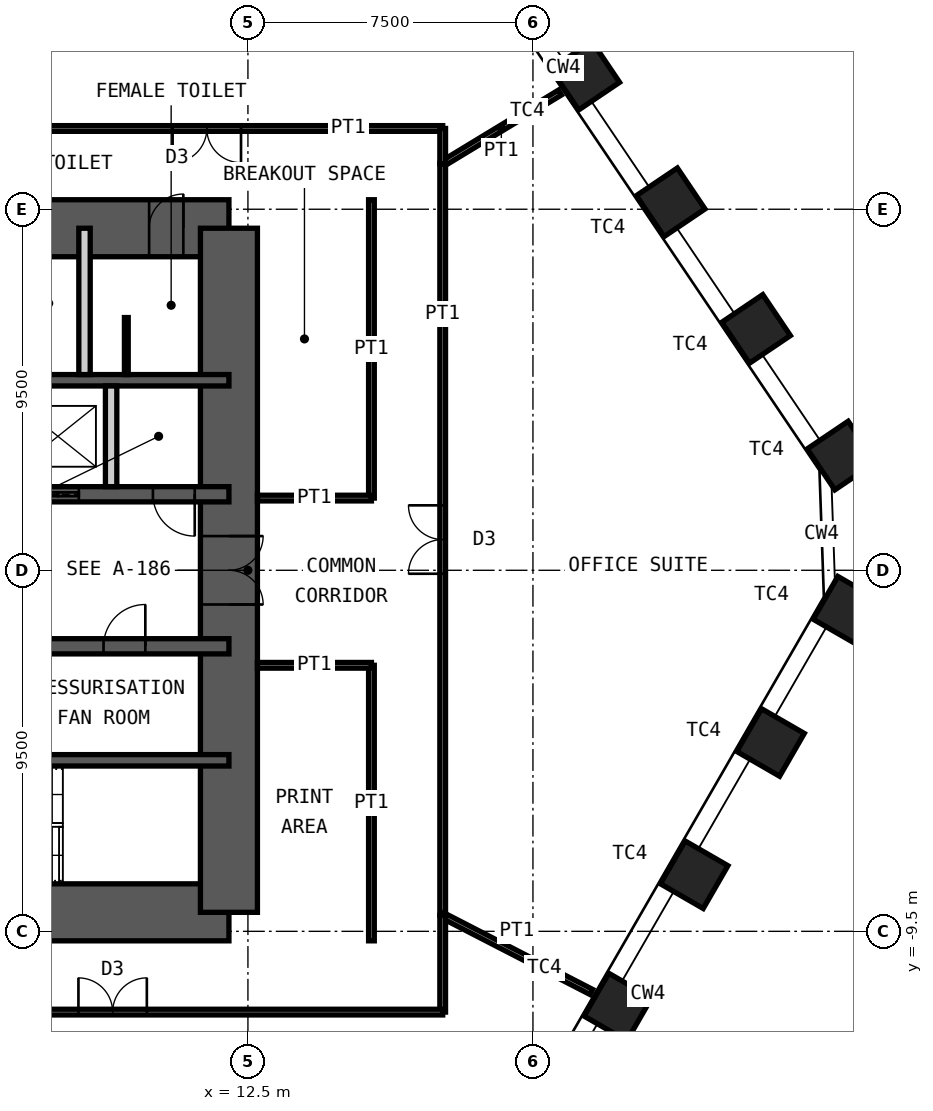
"""IFC4 building model, lengths in metres.
Left out: names, types, materials, properties, quantities, classifications, styles, units other than length and angle.
Written with IfcOpenShell. Run it as: python <this file> out.ifc"""

import sys

from ifc_helpers import new_model, si_unit, direction, frame, frame_2d, origin, origin_2d, place, context, subcontext, project, spatial, rectangle, hollow_rectangle, extrude, element, fill, save


model = new_model("IFC4")
c1 = context("Model", 3, precision=1e-05, world=origin(), true_north=direction((0.0, 1.0)))
c2 = subcontext(c1, "Body", "Model", "MODEL_VIEW")
j1 = project(units=[si_unit("LENGTHUNIT", "METRE"), si_unit("PLANEANGLEUNIT", "RADIAN")], contexts=[c1])
p1 = place(None, origin())
s1 = spatial("IfcSite", under=j1, at=p1, CompositionType="ELEMENT")
p2 = place(p1, origin())
s2 = spatial("IfcBuilding", under=s1, at=p2, CompositionType="ELEMENT")
p3 = place(p2, frame((0.0, 0.0, 145.0)))
s3 = spatial("IfcBuildingStorey", under=s2, at=p3, CompositionType="ELEMENT", Elevation=145.0)
for number, where, z_axis, x_axis in (
    (1, (21.377, 13.014, 0.0), (0.0, 0.0, 1.0), (-0.559, 0.829, 0.0)),
    (2, (23.625, 9.682, 0.0), (0.0, 0.0, 1.0), (-0.559, 0.829, 0.0)),
    (3, (25.872, 6.351, 0.0), (0.0, 0.0, 1.0), (-0.559, 0.829, 0.0)),
    (4, (28.119, 3.019, 0.0), (0.0, 0.0, 1.0), (-0.559, 0.829, 0.0)),
    (5, (28.261, -1.05, 0.0), (0.0, 0.0, 1.0), (0.5, 0.866, 0.0)),
    (6, (26.252, -4.53, 0.0), (0.0, 0.0, 1.0), (0.5, 0.866, 0.0)),
    (7, (24.242, -8.011, 0.0), (0.0, 0.0, 1.0), (0.5, 0.866, 0.0)),
    (8, (22.233, -11.491, 0.0), (0.0, 0.0, 1.0), (0.5, 0.866, 0.0)),
):
    element("IfcColumn", number, at=place(p3, frame(where, z_axis=z_axis, x_axis=x_axis)), inside=s3, PredefinedType="COLUMN", context=c2, shape_type="SweptSolid", body=[
        extrude(hollow_rectangle(XDim=1.3, YDim=1.3, WallThickness=0.1, at=origin_2d()), origin(), (0.0, 0.0, 1.0), 4.2),
    ])
p4 = place(p3, frame((-12.0, 9.0, 0.0), z_axis=(0.0, 0.0, 1.0), x_axis=(1.0, 0.0, 0.0)))
e9 = element("IfcWall", 9, at=p4, inside=s3, PredefinedType="SHEAR", context=c2, shape_type="SweptSolid", body=[
    extrude(rectangle(XDim=24.0, YDim=1.5, at=frame_2d((12.0, 0.0))), origin(), (0.0, 0.0, 1.0), 4.2),
])
p5 = place(p4, frame((10.4, 0.0, 0.0)))
e10 = element("IfcOpeningElement", 10, at=p5, cuts=e9, PredefinedType="OPENING", context=c2, shape_type="SweptSolid", body=[
    extrude(rectangle(XDim=1.0, YDim=2.1, at=frame_2d((0.5, 1.05))), frame((0.0, 0.76, 0.0), z_axis=(0.0, -1.0, 0.0), x_axis=(1.0, 0.0, 0.0)), (0.0, 0.0, 1.0), 1.52),
])
p6 = place(p4, frame((17.6, 0.0, 0.0)))
e11 = element("IfcOpeningElement", 11, at=p6, cuts=e9, PredefinedType="OPENING", context=c2, shape_type="SweptSolid", body=[
    extrude(rectangle(XDim=0.9, YDim=2.1, at=frame_2d((0.45, 1.05))), frame((0.0, 0.76, 0.0), z_axis=(0.0, -1.0, 0.0), x_axis=(1.0, 0.0, 0.0)), (0.0, 0.0, 1.0), 1.52),
])
p7 = place(p4, frame((21.9, 0.0, 0.0)))
e12 = element("IfcOpeningElement", 12, at=p7, cuts=e9, PredefinedType="OPENING", context=c2, shape_type="SweptSolid", body=[
    extrude(rectangle(XDim=0.9, YDim=2.1, at=frame_2d((0.45, 1.05))), frame((0.0, 0.76, 0.0), z_axis=(0.0, -1.0, 0.0), x_axis=(1.0, 0.0, 0.0)), (0.0, 0.0, 1.0), 1.52),
])
p8 = place(p3, frame((-12.0, -9.0, 0.0), z_axis=(0.0, 0.0, 1.0), x_axis=(1.0, 0.0, 0.0)))
e13 = element("IfcWall", 13, at=p8, inside=s3, PredefinedType="SHEAR", context=c2, shape_type="SweptSolid", body=[
    extrude(rectangle(XDim=24.0, YDim=1.5, at=frame_2d((12.0, 0.0))), origin(), (0.0, 0.0, 1.0), 4.2),
])
p9 = place(p8, frame((1.35, 0.0, 0.0)))
e14 = element("IfcOpeningElement", 14, at=p9, cuts=e13, PredefinedType="OPENING", context=c2, shape_type="SweptSolid", body=[
    extrude(rectangle(XDim=1.0, YDim=2.1, at=frame_2d((0.5, 1.05))), frame((0.0, 0.76, 0.0), z_axis=(0.0, -1.0, 0.0), x_axis=(1.0, 0.0, 0.0)), (0.0, 0.0, 1.0), 1.52),
])
p10 = place(p8, frame((5.325, 0.0, 0.0)))
e15 = element("IfcOpeningElement", 15, at=p10, cuts=e13, PredefinedType="OPENING", context=c2, shape_type="SweptSolid", body=[
    extrude(rectangle(XDim=1.15, YDim=2.1, at=frame_2d((0.575, 1.05))), frame((0.0, 0.76, 0.0), z_axis=(0.0, -1.0, 0.0), x_axis=(1.0, 0.0, 0.0)), (0.0, 0.0, 1.0), 1.52),
])
p11 = place(p8, frame((12.6, 0.0, 0.0)))
e16 = element("IfcOpeningElement", 16, at=p11, cuts=e13, PredefinedType="OPENING", context=c2, shape_type="SweptSolid", body=[
    extrude(rectangle(XDim=1.0, YDim=2.1, at=frame_2d((0.5, 1.05))), frame((0.0, 0.76, 0.0), z_axis=(0.0, -1.0, 0.0), x_axis=(1.0, 0.0, 0.0)), (0.0, 0.0, 1.0), 1.52),
])
p12 = place(p3, frame((12.0, -9.0, 0.0), z_axis=(0.0, 0.0, 1.0), x_axis=(0.0, 1.0, 0.0)))
e17 = element("IfcWall", 17, at=p12, inside=s3, PredefinedType="SHEAR", context=c2, shape_type="SweptSolid", body=[
    extrude(rectangle(XDim=18.0, YDim=1.5, at=frame_2d((9.0, 0.0))), origin(), (0.0, 0.0, 1.0), 4.2),
])
p13 = place(p12, frame((8.1, 0.0, 0.0)))
e18 = element("IfcOpeningElement", 18, at=p13, cuts=e17, PredefinedType="OPENING", context=c2, shape_type="SweptSolid", body=[
    extrude(rectangle(XDim=1.8, YDim=2.1, at=frame_2d((0.9, 1.05))), frame((0.0, 0.76, 0.0), z_axis=(0.0, -1.0, 0.0), x_axis=(1.0, 0.0, 0.0)), (0.0, 0.0, 1.0), 1.52),
])
p14 = place(p3, frame((-12.0, 5.0, 0.0), z_axis=(0.0, 0.0, 1.0), x_axis=(1.0, 0.0, 0.0)))
e19 = element("IfcWall", 19, at=p14, inside=s3, PredefinedType="SHEAR", context=c2, shape_type="SweptSolid", body=[
    extrude(rectangle(XDim=24.0, YDim=0.3, at=frame_2d((12.0, 0.0))), origin(), (0.0, 0.0, 1.0), 4.2),
])
p15 = place(p3, frame((-12.0, 2.0, 0.0), z_axis=(0.0, 0.0, 1.0), x_axis=(1.0, 0.0, 0.0)))
e20 = element("IfcWall", 20, at=p15, inside=s3, PredefinedType="SHEAR", context=c2, shape_type="SweptSolid", body=[
    extrude(rectangle(XDim=24.0, YDim=0.4, at=frame_2d((12.0, 0.0))), origin(), (0.0, 0.0, 1.0), 4.2),
])
p16 = place(p15, frame((2.4, 0.0, 0.0)))
e21 = element("IfcOpeningElement", 21, at=p16, cuts=e20, PredefinedType="OPENING", context=c2, shape_type="SweptSolid", body=[
    extrude(rectangle(XDim=1.1, YDim=2.1, at=frame_2d((0.55, 1.05))), frame((0.0, 0.21, 0.0), z_axis=(0.0, -1.0, 0.0), x_axis=(1.0, 0.0, 0.0)), (0.0, 0.0, 1.0), 0.42),
])
p17 = place(p15, frame((22.0, 0.0, 0.0)))
e22 = element("IfcOpeningElement", 22, at=p17, cuts=e20, PredefinedType="OPENING", context=c2, shape_type="SweptSolid", body=[
    extrude(rectangle(XDim=1.1, YDim=2.1, at=frame_2d((0.55, 1.05))), frame((0.0, 0.21, 0.0), z_axis=(0.0, -1.0, 0.0), x_axis=(1.0, 0.0, 0.0)), (0.0, 0.0, 1.0), 0.42),
])
p18 = place(p15, frame((10.15, 0.0, 0.0)))
e23 = element("IfcOpeningElement", 23, at=p18, cuts=e20, PredefinedType="OPENING", context=c2, shape_type="SweptSolid", body=[
    extrude(rectangle(XDim=1.0, YDim=2.1, at=frame_2d((0.5, 1.05))), frame((0.0, 0.21, 0.0), z_axis=(0.0, -1.0, 0.0), x_axis=(1.0, 0.0, 0.0)), (0.0, 0.0, 1.0), 0.42),
])
p19 = place(p15, frame((6.9, 0.0, 0.0)))
e24 = element("IfcOpeningElement", 24, at=p19, cuts=e20, PredefinedType="OPENING", context=c2, shape_type="SweptSolid", body=[
    extrude(rectangle(XDim=1.0, YDim=2.1, at=frame_2d((0.5, 1.05))), frame((0.0, 0.21, 0.0), z_axis=(0.0, -1.0, 0.0), x_axis=(1.0, 0.0, 0.0)), (0.0, 0.0, 1.0), 0.42),
])
p20 = place(p15, frame((13.35, 0.0, 0.0)))
e25 = element("IfcOpeningElement", 25, at=p20, cuts=e20, PredefinedType="OPENING", context=c2, shape_type="SweptSolid", body=[
    extrude(rectangle(XDim=1.1, YDim=2.4, at=frame_2d((0.55, 1.2))), frame((0.0, 0.21, 0.0), z_axis=(0.0, -1.0, 0.0), x_axis=(1.0, 0.0, 0.0)), (0.0, 0.0, 1.0), 0.42),
])
p21 = place(p15, frame((16.15, 0.0, 0.0)))
e26 = element("IfcOpeningElement", 26, at=p21, cuts=e20, PredefinedType="OPENING", context=c2, shape_type="SweptSolid", body=[
    extrude(rectangle(XDim=1.1, YDim=2.4, at=frame_2d((0.55, 1.2))), frame((0.0, 0.21, 0.0), z_axis=(0.0, -1.0, 0.0), x_axis=(1.0, 0.0, 0.0)), (0.0, 0.0, 1.0), 0.42),
])
p22 = place(p15, frame((18.95, 0.0, 0.0)))
e27 = element("IfcOpeningElement", 27, at=p22, cuts=e20, PredefinedType="OPENING", context=c2, shape_type="SweptSolid", body=[
    extrude(rectangle(XDim=1.1, YDim=2.4, at=frame_2d((0.55, 1.2))), frame((0.0, 0.21, 0.0), z_axis=(0.0, -1.0, 0.0), x_axis=(1.0, 0.0, 0.0)), (0.0, 0.0, 1.0), 0.42),
])
p23 = place(p3, frame((-12.0, -2.0, 0.0), z_axis=(0.0, 0.0, 1.0), x_axis=(1.0, 0.0, 0.0)))
e28 = element("IfcWall", 28, at=p23, inside=s3, PredefinedType="SHEAR", context=c2, shape_type="SweptSolid", body=[
    extrude(rectangle(XDim=24.0, YDim=0.4, at=frame_2d((12.0, 0.0))), origin(), (0.0, 0.0, 1.0), 4.2),
])
p24 = place(p23, frame((1.1, 0.0, 0.0)))
e29 = element("IfcOpeningElement", 29, at=p24, cuts=e28, PredefinedType="OPENING", context=c2, shape_type="SweptSolid", body=[
    extrude(rectangle(XDim=1.1, YDim=2.1, at=frame_2d((0.55, 1.05))), frame((0.0, 0.21, 0.0), z_axis=(0.0, -1.0, 0.0), x_axis=(1.0, 0.0, 0.0)), (0.0, 0.0, 1.0), 0.42),
])
p25 = place(p23, frame((13.55, 0.0, 0.0)))
e30 = element("IfcOpeningElement", 30, at=p25, cuts=e28, PredefinedType="OPENING", context=c2, shape_type="SweptSolid", body=[
    extrude(rectangle(XDim=1.1, YDim=2.1, at=frame_2d((0.55, 1.05))), frame((0.0, 0.21, 0.0), z_axis=(0.0, -1.0, 0.0), x_axis=(1.0, 0.0, 0.0)), (0.0, 0.0, 1.0), 0.42),
])
p26 = place(p23, frame((20.7, 0.0, 0.0)))
e31 = element("IfcOpeningElement", 31, at=p26, cuts=e28, PredefinedType="OPENING", context=c2, shape_type="SweptSolid", body=[
    extrude(rectangle(XDim=1.1, YDim=2.1, at=frame_2d((0.55, 1.05))), frame((0.0, 0.21, 0.0), z_axis=(0.0, -1.0, 0.0), x_axis=(1.0, 0.0, 0.0)), (0.0, 0.0, 1.0), 0.42),
])
p27 = place(p23, frame((4.0, 0.0, 0.0)))
e32 = element("IfcOpeningElement", 32, at=p27, cuts=e28, PredefinedType="OPENING", context=c2, shape_type="SweptSolid", body=[
    extrude(rectangle(XDim=1.0, YDim=2.1, at=frame_2d((0.5, 1.05))), frame((0.0, 0.21, 0.0), z_axis=(0.0, -1.0, 0.0), x_axis=(1.0, 0.0, 0.0)), (0.0, 0.0, 1.0), 0.42),
])
p28 = place(p3, frame((-12.0, -5.0, 0.0), z_axis=(0.0, 0.0, 1.0), x_axis=(1.0, 0.0, 0.0)))
e33 = element("IfcWall", 33, at=p28, inside=s3, PredefinedType="SHEAR", context=c2, shape_type="SweptSolid", body=[
    extrude(rectangle(XDim=24.0, YDim=0.3, at=frame_2d((12.0, 0.0))), origin(), (0.0, 0.0, 1.0), 4.2),
])
p29 = place(p3, frame((8.2, 5.15, 0.0), z_axis=(0.0, 0.0, 1.0), x_axis=(0.0, 1.0, 0.0)))
e34 = element("IfcWall", 34, at=p29, inside=s3, PredefinedType="PARTITIONING", context=c2, shape_type="SweptSolid", body=[
    extrude(rectangle(XDim=3.85, YDim=0.3, at=frame_2d((1.925, 0.0))), origin(), (0.0, 0.0, 1.0), 3.98),
])
p30 = place(p3, frame((8.9, 2.2, 0.0), z_axis=(0.0, 0.0, 1.0), x_axis=(0.0, 1.0, 0.0)))
e35 = element("IfcWall", 35, at=p30, inside=s3, PredefinedType="PARTITIONING", context=c2, shape_type="SweptSolid", body=[
    extrude(rectangle(XDim=2.65, YDim=0.3, at=frame_2d((1.325, 0.0))), origin(), (0.0, 0.0, 1.0), 3.98),
])
p31 = place(p3, frame((9.3, 5.15, 0.0), z_axis=(0.0, 0.0, 1.0), x_axis=(0.0, 1.0, 0.0)))
e36 = element("IfcWall", 36, at=p31, inside=s3, PredefinedType="PARTITIONING", context=c2, shape_type="SweptSolid", body=[
    extrude(rectangle(XDim=1.5, YDim=0.1, at=frame_2d((0.75, 0.0))), origin(), (0.0, 0.0, 1.0), 2.1),
])
p32 = place(p3, frame((20.711, 12.571, 0.0), z_axis=(0.0, 0.0, 1.0), x_axis=(-0.854862500505, -0.518854608952, 0.0)))
e37 = element("IfcWall", 37, at=p32, inside=s3, PredefinedType="PARTITIONING", context=c2, shape_type="SweptSolid", body=[
    extrude(rectangle(XDim=3.61, YDim=0.15, at=frame_2d((1.805, 0.0))), origin(), (0.0, 0.0, 1.0), 3.33),
])
p33 = place(p3, frame((17.625, 10.698, 0.0), z_axis=(0.0, 0.0, 1.0), x_axis=(0.0, -1.0, 0.0)))
e38 = element("IfcWall", 38, at=p33, inside=s3, PredefinedType="PARTITIONING", context=c2, shape_type="SweptSolid", body=[
    extrude(rectangle(XDim=19.778, YDim=0.15, at=frame_2d((9.889, 0.0))), origin(), (0.0, 0.0, 1.0), 4.03),
])
p34 = place(p33, frame((8.989, 0.0, 0.0)))
e39 = element("IfcOpeningElement", 39, at=p34, cuts=e38, PredefinedType="OPENING", context=c2, shape_type="SweptSolid", body=[
    extrude(rectangle(XDim=1.8, YDim=2.4, at=frame_2d((0.9, 1.2))), frame((0.0, 0.085, 0.0), z_axis=(0.0, -1.0, 0.0), x_axis=(1.0, 0.0, 0.0)), (0.0, 0.0, 1.0), 0.17),
])
p35 = place(p3, frame((21.538, -11.096, 0.0), z_axis=(0.0, 0.0, 1.0), x_axis=(-0.888982083501, 0.457941977999, 0.0)))
e40 = element("IfcWall", 40, at=p35, inside=s3, PredefinedType="PARTITIONING", context=c2, shape_type="SweptSolid", body=[
    extrude(rectangle(XDim=4.401, YDim=0.15, at=frame_2d((2.201, 0.0))), origin(), (0.0, 0.0, 1.0), 3.33),
])
p36 = place(p3, frame((17.625, -9.08, 0.0), z_axis=(0.0, 0.0, 1.0), x_axis=(0.0, -1.0, 0.0)))
e41 = element("IfcWall", 41, at=p36, inside=s3, PredefinedType="PARTITIONING", context=c2, shape_type="SweptSolid", body=[
    extrude(rectangle(XDim=2.545, YDim=0.15, at=frame_2d((1.272, 0.0))), origin(), (0.0, 0.0, 1.0), 4.03),
])
p37 = place(p3, frame((17.625, -11.625, 0.0), z_axis=(0.0, 0.0, 1.0), x_axis=(-1.0, 0.0, 0.0)))
e42 = element("IfcWall", 42, at=p37, inside=s3, PredefinedType="PARTITIONING", context=c2, shape_type="SweptSolid", body=[
    extrude(rectangle(XDim=17.37, YDim=0.15, at=frame_2d((8.685, 0.0))), origin(), (0.0, 0.0, 1.0), 4.03),
])
p38 = place(p37, frame((7.785, 0.0, 0.0)))
e43 = element("IfcOpeningElement", 43, at=p38, cuts=e42, PredefinedType="OPENING", context=c2, shape_type="SweptSolid", body=[
    extrude(rectangle(XDim=1.8, YDim=2.4, at=frame_2d((0.9, 1.2))), frame((0.0, 0.085, 0.0), z_axis=(0.0, -1.0, 0.0), x_axis=(1.0, 0.0, 0.0)), (0.0, 0.0, 1.0), 0.17),
])
p39 = place(p3, frame((10.852, 24.209, 0.0), z_axis=(0.0, 0.0, 1.0), x_axis=(-0.40904878746, -0.912512514696, 0.0)))
e44 = element("IfcWall", 44, at=p39, inside=s3, PredefinedType="PARTITIONING", context=c2, shape_type="SweptSolid", body=[
    extrude(rectangle(XDim=13.79, YDim=0.15, at=frame_2d((6.895, 0.0))), origin(), (0.0, 0.0, 1.0), 2.93),
])
p40 = place(p3, frame((5.211, 11.625, 0.0), z_axis=(0.0, 0.0, 1.0), x_axis=(1.0, 0.0, 0.0)))
e45 = element("IfcWall", 45, at=p40, inside=s3, PredefinedType="PARTITIONING", context=c2, shape_type="SweptSolid", body=[
    extrude(rectangle(XDim=12.414, YDim=0.15, at=frame_2d((6.207, 0.0))), origin(), (0.0, 0.0, 1.0), 4.03),
])
p41 = place(p40, frame((5.307, 0.0, 0.0)))
e46 = element("IfcOpeningElement", 46, at=p41, cuts=e45, PredefinedType="OPENING", context=c2, shape_type="SweptSolid", body=[
    extrude(rectangle(XDim=1.8, YDim=2.4, at=frame_2d((0.9, 1.2))), frame((0.0, 0.085, 0.0), z_axis=(0.0, -1.0, 0.0), x_axis=(1.0, 0.0, 0.0)), (0.0, 0.0, 1.0), 0.17),
])
p42 = place(p3, frame((17.625, 11.625, 0.0), z_axis=(0.0, 0.0, 1.0), x_axis=(0.0, -1.0, 0.0)))
e47 = element("IfcWall", 47, at=p42, inside=s3, PredefinedType="PARTITIONING", context=c2, shape_type="SweptSolid", body=[
    extrude(rectangle(XDim=0.927, YDim=0.15, at=frame_2d((0.464, 0.0))), origin(), (0.0, 0.0, 1.0), 4.03),
])
p43 = place(p3, frame((15.75, 1.9, 0.0), z_axis=(0.0, 0.0, 1.0), x_axis=(0.0, 1.0, 0.0)))
e48 = element("IfcWall", 48, at=p43, inside=s3, PredefinedType="PARTITIONING", context=c2, shape_type="SweptSolid", body=[
    extrude(rectangle(XDim=7.85, YDim=0.15, at=frame_2d((3.925, 0.0))), origin(), (0.0, 0.0, 1.0), 4.03),
])
p44 = place(p3, frame((12.75, 1.9, 0.0), z_axis=(0.0, 0.0, 1.0), x_axis=(1.0, 0.0, 0.0)))
e49 = element("IfcWall", 49, at=p44, inside=s3, PredefinedType="PARTITIONING", context=c2, shape_type="SweptSolid", body=[
    extrude(rectangle(XDim=3.0, YDim=0.15, at=frame_2d((1.5, 0.0))), origin(), (0.0, 0.0, 1.0), 2.93),
])
p45 = place(p3, frame((15.75, -9.75, 0.0), z_axis=(0.0, 0.0, 1.0), x_axis=(0.0, 1.0, 0.0)))
e50 = element("IfcWall", 50, at=p45, inside=s3, PredefinedType="PARTITIONING", context=c2, shape_type="SweptSolid", body=[
    extrude(rectangle(XDim=7.25, YDim=0.15, at=frame_2d((3.625, 0.0))), origin(), (0.0, 0.0, 1.0), 4.03),
])
p46 = place(p3, frame((12.75, -2.5, 0.0), z_axis=(0.0, 0.0, 1.0), x_axis=(1.0, 0.0, 0.0)))
e51 = element("IfcWall", 51, at=p46, inside=s3, PredefinedType="PARTITIONING", context=c2, shape_type="SweptSolid", body=[
    extrude(rectangle(XDim=3.0, YDim=0.15, at=frame_2d((1.5, 0.0))), origin(), (0.0, 0.0, 1.0), 3.33),
])
p47 = place(p7, origin())
e52 = element("IfcDoor", 52, at=p47, inside=s3, OperationType="SINGLE_SWING_LEFT", PredefinedType="DOOR", context=c2, shape_type="SweptSolid", body=[
    extrude(rectangle(XDim=0.9, YDim=2.1, at=frame_2d((0.45, 1.05))), frame((0.0, 0.025, 0.0), z_axis=(0.0, -1.0, 0.0), x_axis=(1.0, 0.0, 0.0)), (0.0, 0.0, 1.0), 0.05),
])
fill(e12, e52)
p48 = place(p17, origin())
e53 = element("IfcDoor", 53, at=p48, inside=s3, OperationType="SINGLE_SWING_RIGHT", PredefinedType="DOOR", context=c2, shape_type="SweptSolid", body=[
    extrude(rectangle(XDim=1.1, YDim=2.1, at=frame_2d((0.55, 1.05))), frame((0.0, 0.025, 0.0), z_axis=(0.0, -1.0, 0.0), x_axis=(1.0, 0.0, 0.0)), (0.0, 0.0, 1.0), 0.05),
])
fill(e22, e53)
p49 = place(p26, origin())
e54 = element("IfcDoor", 54, at=p49, inside=s3, OperationType="SINGLE_SWING_LEFT", PredefinedType="DOOR", context=c2, shape_type="SweptSolid", body=[
    extrude(rectangle(XDim=1.1, YDim=2.1, at=frame_2d((0.55, 1.05))), frame((0.0, 0.025, 0.0), z_axis=(0.0, -1.0, 0.0), x_axis=(1.0, 0.0, 0.0)), (0.0, 0.0, 1.0), 0.05),
])
fill(e31, e54)
p50 = place(p13, origin())
e55 = element("IfcDoor", 55, at=p50, inside=s3, OperationType="DOUBLE_DOOR_DOUBLE_SWING", PredefinedType="DOOR", context=c2, shape_type="SweptSolid", body=[
    extrude(rectangle(XDim=1.8, YDim=2.1, at=frame_2d((0.9, 1.05))), frame((0.0, 0.025, 0.0), z_axis=(0.0, -1.0, 0.0), x_axis=(1.0, 0.0, 0.0)), (0.0, 0.0, 1.0), 0.05),
])
fill(e18, e55)
p51 = place(p22, origin())
e56 = element("IfcDoor", 56, at=p51, inside=s3, OperationType="DOUBLE_DOOR_SLIDING", PredefinedType="DOOR", context=c2, shape_type="SweptSolid", body=[
    extrude(rectangle(XDim=1.1, YDim=2.4, at=frame_2d((0.55, 1.2))), frame((0.0, 0.025, 0.0), z_axis=(0.0, -1.0, 0.0), x_axis=(1.0, 0.0, 0.0)), (0.0, 0.0, 1.0), 0.05),
])
fill(e27, e56)
p52 = place(p34, origin())
e57 = element("IfcDoor", 57, at=p52, inside=s3, OperationType="DOUBLE_DOOR_DOUBLE_SWING", PredefinedType="DOOR", context=c2, shape_type="SweptSolid", body=[
    extrude(rectangle(XDim=1.8, YDim=2.4, at=frame_2d((0.9, 1.2))), frame((0.0, 0.025, 0.0), z_axis=(0.0, -1.0, 0.0), x_axis=(1.0, 0.0, 0.0)), (0.0, 0.0, 1.0), 0.05),
])
fill(e39, e57)
p53 = place(p38, origin())
e58 = element("IfcDoor", 58, at=p53, inside=s3, OperationType="DOUBLE_DOOR_DOUBLE_SWING", PredefinedType="DOOR", context=c2, shape_type="SweptSolid", body=[
    extrude(rectangle(XDim=1.8, YDim=2.4, at=frame_2d((0.9, 1.2))), frame((0.0, 0.025, 0.0), z_axis=(0.0, -1.0, 0.0), x_axis=(1.0, 0.0, 0.0)), (0.0, 0.0, 1.0), 0.05),
])
fill(e43, e58)
p54 = place(p41, origin())
e59 = element("IfcDoor", 59, at=p54, inside=s3, OperationType="DOUBLE_DOOR_DOUBLE_SWING", PredefinedType="DOOR", context=c2, shape_type="SweptSolid", body=[
    extrude(rectangle(XDim=1.8, YDim=2.4, at=frame_2d((0.9, 1.2))), frame((0.0, 0.025, 0.0), z_axis=(0.0, -1.0, 0.0), x_axis=(1.0, 0.0, 0.0)), (0.0, 0.0, 1.0), 0.05),
])
fill(e46, e59)
save(model, sys.argv[1])
